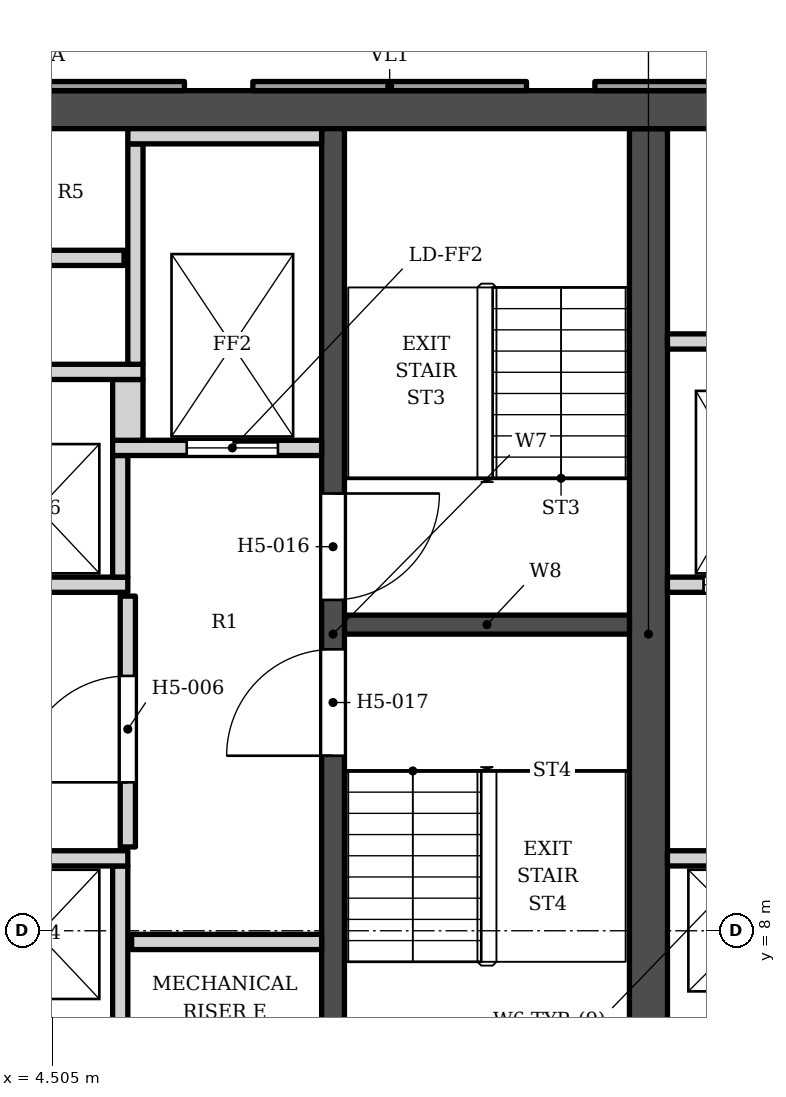
"""IFC4 building model, lengths in metres.
Left out: names, types, materials, properties, quantities, classifications, styles, units other than length and angle.
Written with IfcOpenShell. Run it as: python <this file> out.ifc"""

import sys

from ifc_helpers import new_model, si_unit, direction, frame, frame_2d, origin, place, context, subcontext, project, spatial, polyline, rectangle, outline, extrude, element, fill, save


model = new_model("IFC4")
c1 = context("Model", 3, precision=1e-05, world=origin(), true_north=direction((0.0, 1.0)))
c2 = subcontext(c1, "Body", "Model", "MODEL_VIEW")
j1 = project(units=[si_unit("LENGTHUNIT", "METRE"), si_unit("PLANEANGLEUNIT", "RADIAN")], contexts=[c1])
p1 = place(None, origin())
s1 = spatial("IfcSite", under=j1, at=p1, CompositionType="ELEMENT")
p2 = place(p1, origin())
s2 = spatial("IfcBuilding", under=s1, at=p2, CompositionType="ELEMENT")
p3 = place(p2, frame((0.0, 0.0, 91.8)))
s3 = spatial("IfcBuildingStorey", under=s2, at=p3, CompositionType="ELEMENT", Elevation=91.8)
p4 = place(p3, frame((-16.9, 18.802, 0.0), z_axis=(0.0, 0.0, 1.0), x_axis=(1.0, 0.0, 0.0)))
e1 = element("IfcWall", 1, at=p4, inside=s3, PredefinedType="SHEAR", context=c2, shape_type="SweptSolid", body=[
    extrude(rectangle(XDim=33.8, YDim=0.5, at=frame_2d((16.9, 0.0))), origin(), (0.0, 0.0, 1.0), 3.4),
])
p5 = place(p3, frame((12.35, 5.253, 0.0), z_axis=(0.0, 0.0, 1.0), x_axis=(0.0, 1.0, 0.0)))
e2 = element("IfcWall", 2, at=p5, inside=s3, PredefinedType="SHEAR", context=c2, shape_type="SweptSolid", body=[
    extrude(rectangle(XDim=13.3, YDim=0.5, at=frame_2d((6.65, 0.0))), origin(), (0.0, 0.0, 1.0), 3.4),
])
p6 = place(p3, frame((8.2, 5.253, 0.0), z_axis=(0.0, 0.0, 1.0), x_axis=(0.0, 1.0, 0.0)))
e3 = element("IfcWall", 3, at=p6, inside=s3, PredefinedType="SHEAR", context=c2, shape_type="SweptSolid", body=[
    extrude(rectangle(XDim=13.3, YDim=0.3, at=frame_2d((6.65, 0.0))), origin(), (0.0, 0.0, 1.0), 3.4),
])
p7 = place(p6, frame((7.1, 0.0, 0.0)))
e4 = element("IfcOpeningElement", 4, at=p7, cuts=e3, PredefinedType="OPENING", context=c2, shape_type="SweptSolid", body=[
    extrude(rectangle(XDim=1.4, YDim=2.1, at=frame_2d((0.7, 1.05))), frame((0.0, 0.16, 0.0), z_axis=(0.0, -1.0, 0.0), x_axis=(1.0, 0.0, 0.0)), (0.0, 0.0, 1.0), 0.32),
])
p8 = place(p6, frame((5.05, 0.0, 0.0)))
e5 = element("IfcOpeningElement", 5, at=p8, cuts=e3, PredefinedType="OPENING", context=c2, shape_type="SweptSolid", body=[
    extrude(rectangle(XDim=1.4, YDim=2.1, at=frame_2d((0.7, 1.05))), frame((0.0, 0.16, 0.0), z_axis=(0.0, -1.0, 0.0), x_axis=(1.0, 0.0, 0.0)), (0.0, 0.0, 1.0), 0.32),
])
p9 = place(p3, frame((8.35, 12.028, 0.0), z_axis=(0.0, 0.0, 1.0), x_axis=(1.0, 0.0, 0.0)))
e6 = element("IfcWall", 6, at=p9, inside=s3, PredefinedType="SHEAR", context=c2, shape_type="SweptSolid", body=[
    extrude(rectangle(XDim=3.75, YDim=0.25, at=frame_2d((1.875, 0.0))), origin(), (0.0, 0.0, 1.0), 3.4),
])
p10 = place(p3, origin())
e7 = element("IfcWall", 7, at=p10, inside=s3, PredefinedType="SOLIDWALL", context=c2, shape_type="SweptSolid", body=[
    extrude(outline(polyline([(11.645, 19.173), (11.645, 19.052), (15.245, 19.052), (15.245, 19.173), (11.645, 19.173)])), origin(), (0.0, 0.0, 1.0), 2.65),
])
p11 = place(p3, origin())
e8 = element("IfcWall", 8, at=p11, inside=s3, PredefinedType="ELEMENTEDWALL", context=c2, shape_type="SweptSolid", body=[
    extrude(outline(polyline([(7.145, 19.173), (7.145, 19.052), (10.745, 19.052), (10.745, 19.173), (7.145, 19.173)])), origin(), (0.0, 0.0, 1.0), 2.65),
])
p12 = place(p3, origin())
e9 = element("IfcWall", 9, at=p12, inside=s3, PredefinedType="SOLIDWALL", context=c2, shape_type="SweptSolid", body=[
    extrude(outline(polyline([(2.645, 19.173), (2.645, 19.052), (6.245, 19.052), (6.245, 19.173), (2.645, 19.173)])), origin(), (0.0, 0.0, 1.0), 2.65),
])
for number, where, z_axis, x_axis in (
    (10, (5.4, 6.353, 0.0), (0.0, 0.0, 1.0), (0.0, 1.0, 0.0)),
    (11, (5.55, 7.853, 0.0), (0.0, 0.0, 1.0), (1.0, 0.0, 0.0)),
):
    element("IfcWall", number, at=place(p3, frame(where, z_axis=z_axis, x_axis=x_axis)), inside=s3, PredefinedType="SOLIDWALL", context=c2, shape_type="SweptSolid", body=[
        extrude(rectangle(XDim=2.5, YDim=0.2, at=frame_2d((1.25, 0.0))), origin(), (0.0, 0.0, 1.0), 3.23),
    ])
p13 = place(p3, frame((1.0, 8.953, 0.0), z_axis=(0.0, 0.0, 1.0), x_axis=(1.0, 0.0, 0.0)))
e12 = element("IfcWall", 12, at=p13, inside=s3, PredefinedType="SOLIDWALL", context=c2, shape_type="SweptSolid", body=[
    extrude(rectangle(XDim=4.5, YDim=0.2, at=frame_2d((2.25, 0.0))), origin(), (0.0, 0.0, 1.0), 3.23),
])
p14 = place(p3, frame((12.6, 8.953, 0.0), z_axis=(0.0, 0.0, 1.0), x_axis=(1.0, 0.0, 0.0)))
e13 = element("IfcWall", 13, at=p14, inside=s3, PredefinedType="SOLIDWALL", context=c2, shape_type="SweptSolid", body=[
    extrude(rectangle(XDim=4.3, YDim=0.2, at=frame_2d((2.15, 0.0))), origin(), (0.0, 0.0, 1.0), 3.23),
])
p15 = place(p14, frame((0.525, 0.0, 0.0)))
e14 = element("IfcOpeningElement", 14, at=p15, cuts=e13, PredefinedType="OPENING", context=c2, shape_type="SweptSolid", body=[
    extrude(rectangle(XDim=1.1, YDim=2.1, at=frame_2d((0.55, 1.05))), frame((0.0, 0.11, 0.0), z_axis=(0.0, -1.0, 0.0), x_axis=(1.0, 0.0, 0.0)), (0.0, 0.0, 1.0), 0.22),
])
p16 = place(p14, frame((2.775, 0.0, 0.0)))
e15 = element("IfcOpeningElement", 15, at=p16, cuts=e13, PredefinedType="OPENING", context=c2, shape_type="SweptSolid", body=[
    extrude(rectangle(XDim=1.1, YDim=2.1, at=frame_2d((0.55, 1.05))), frame((0.0, 0.11, 0.0), z_axis=(0.0, -1.0, 0.0), x_axis=(1.0, 0.0, 0.0)), (0.0, 0.0, 1.0), 0.22),
])
p17 = place(p3, frame((5.5, 9.103, 0.0), z_axis=(0.0, 0.0, 1.0), x_axis=(0.0, 1.0, 0.0)))
e16 = element("IfcWall", 16, at=p17, inside=s3, PredefinedType="SOLIDWALL", context=c2, shape_type="SweptSolid", body=[
    extrude(rectangle(XDim=3.3, YDim=0.2, at=frame_2d((1.65, 0.0))), origin(), (0.0, 0.0, 1.0), 3.23),
])
p18 = place(p17, frame((0.85, 0.0, 0.0)))
e17 = element("IfcOpeningElement", 17, at=p18, cuts=e16, PredefinedType="OPENING", context=c2, shape_type="SweptSolid", body=[
    extrude(rectangle(XDim=1.4, YDim=2.1, at=frame_2d((0.7, 1.05))), frame((0.0, 0.11, 0.0), z_axis=(0.0, -1.0, 0.0), x_axis=(1.0, 0.0, 0.0)), (0.0, 0.0, 1.0), 0.22),
])
p19 = place(p3, frame((-1.5, 12.552, 0.0), z_axis=(0.0, 0.0, 1.0), x_axis=(1.0, 0.0, 0.0)))
e18 = element("IfcWall", 18, at=p19, inside=s3, PredefinedType="SOLIDWALL", context=c2, shape_type="SweptSolid", body=[
    extrude(rectangle(XDim=7.0, YDim=0.2, at=frame_2d((3.5, 0.0))), origin(), (0.0, 0.0, 1.0), 3.23),
])
p20 = place(p3, frame((12.6, 12.552, 0.0), z_axis=(0.0, 0.0, 1.0), x_axis=(1.0, 0.0, 0.0)))
e19 = element("IfcWall", 19, at=p20, inside=s3, PredefinedType="SOLIDWALL", context=c2, shape_type="SweptSolid", body=[
    extrude(rectangle(XDim=4.3, YDim=0.2, at=frame_2d((2.15, 0.0))), origin(), (0.0, 0.0, 1.0), 3.23),
])
p21 = place(p20, frame((0.475, 0.0, 0.0)))
e20 = element("IfcOpeningElement", 20, at=p21, cuts=e19, PredefinedType="OPENING", context=c2, shape_type="SweptSolid", body=[
    extrude(rectangle(XDim=1.2, YDim=2.1, at=frame_2d((0.6, 1.05))), frame((0.0, 0.11, 0.0), z_axis=(0.0, -1.0, 0.0), x_axis=(1.0, 0.0, 0.0)), (0.0, 0.0, 1.0), 0.22),
])
p22 = place(p20, frame((2.625, 0.0, 0.0)))
e21 = element("IfcOpeningElement", 21, at=p22, cuts=e19, PredefinedType="OPENING", context=c2, shape_type="SweptSolid", body=[
    extrude(rectangle(XDim=1.4, YDim=2.1, at=frame_2d((0.7, 1.05))), frame((0.0, 0.11, 0.0), z_axis=(0.0, -1.0, 0.0), x_axis=(1.0, 0.0, 0.0)), (0.0, 0.0, 1.0), 0.22),
])
p23 = place(p3, frame((5.4, 12.653, 0.0), z_axis=(0.0, 0.0, 1.0), x_axis=(0.0, 1.0, 0.0)))
e22 = element("IfcWall", 22, at=p23, inside=s3, PredefinedType="SOLIDWALL", context=c2, shape_type="SweptSolid", body=[
    extrude(rectangle(XDim=1.6, YDim=0.2, at=frame_2d((0.8, 0.0))), origin(), (0.0, 0.0, 1.0), 3.23),
])
p24 = place(p3, frame((5.3, 14.353, 0.0), z_axis=(0.0, 0.0, 1.0), x_axis=(1.0, 0.0, 0.0)))
e23 = element("IfcWall", 23, at=p24, inside=s3, PredefinedType="SOLIDWALL", context=c2, shape_type="SweptSolid", body=[
    extrude(rectangle(XDim=2.75, YDim=0.2, at=frame_2d((1.375, 0.0))), origin(), (0.0, 0.0, 1.0), 3.23),
])
p25 = place(p24, frame((0.975, 0.0, 0.0)))
e24 = element("IfcOpeningElement", 24, at=p25, cuts=e23, PredefinedType="OPENING", context=c2, shape_type="SweptSolid", body=[
    extrude(rectangle(XDim=1.2, YDim=2.1, at=frame_2d((0.6, 1.05))), frame((0.0, 0.11, 0.0), z_axis=(0.0, -1.0, 0.0), x_axis=(1.0, 0.0, 0.0)), (0.0, 0.0, 1.0), 0.22),
])
p26 = place(p3, frame((5.5, 14.453, 0.0), z_axis=(0.0, 0.0, 1.0), x_axis=(0.0, 1.0, 0.0)))
e25 = element("IfcWall", 25, at=p26, inside=s3, PredefinedType="SOLIDWALL", context=c2, shape_type="SweptSolid", body=[
    extrude(rectangle(XDim=0.8, YDim=0.4, at=frame_2d((0.4, 0.0))), origin(), (0.0, 0.0, 1.0), 3.23),
])
p27 = place(p3, frame((-1.5, 15.353, 0.0), z_axis=(0.0, 0.0, 1.0), x_axis=(1.0, 0.0, 0.0)))
e26 = element("IfcWall", 26, at=p27, inside=s3, PredefinedType="SOLIDWALL", context=c2, shape_type="SweptSolid", body=[
    extrude(rectangle(XDim=7.2, YDim=0.2, at=frame_2d((3.6, 0.0))), origin(), (0.0, 0.0, 1.0), 3.23),
])
p28 = place(p3, frame((5.6, 15.453, 0.0), z_axis=(0.0, 0.0, 1.0), x_axis=(0.0, 1.0, 0.0)))
e27 = element("IfcWall", 27, at=p28, inside=s3, PredefinedType="SOLIDWALL", context=c2, shape_type="SweptSolid", body=[
    extrude(rectangle(XDim=2.9, YDim=0.2, at=frame_2d((1.45, 0.0))), origin(), (0.0, 0.0, 1.0), 3.23),
])
p29 = place(p3, frame((12.6, 15.753, 0.0), z_axis=(0.0, 0.0, 1.0), x_axis=(1.0, 0.0, 0.0)))
e28 = element("IfcWall", 28, at=p29, inside=s3, PredefinedType="SOLIDWALL", context=c2, shape_type="SweptSolid", body=[
    extrude(rectangle(XDim=4.3, YDim=0.2, at=frame_2d((2.15, 0.0))), origin(), (0.0, 0.0, 1.0), 3.23),
])
p30 = place(p3, frame((-1.6, 16.853, 0.0), z_axis=(0.0, 0.0, 1.0), x_axis=(1.0, 0.0, 0.0)))
e29 = element("IfcWall", 29, at=p30, inside=s3, PredefinedType="SOLIDWALL", context=c2, shape_type="SweptSolid", body=[
    extrude(rectangle(XDim=7.05, YDim=0.2, at=frame_2d((3.525, 0.0))), origin(), (0.0, 0.0, 1.0), 3.23),
])
p31 = place(p30, frame((1.4, 0.0, 0.0)))
e30 = element("IfcOpeningElement", 30, at=p31, cuts=e29, PredefinedType="OPENING", context=c2, shape_type="SweptSolid", body=[
    extrude(rectangle(XDim=0.9, YDim=2.1, at=frame_2d((0.45, 1.05))), frame((0.0, 0.11, 0.0), z_axis=(0.0, -1.0, 0.0), x_axis=(1.0, 0.0, 0.0)), (0.0, 0.0, 1.0), 0.22),
])
p32 = place(p30, frame((4.9, 0.0, 0.0)))
e31 = element("IfcOpeningElement", 31, at=p32, cuts=e29, PredefinedType="OPENING", context=c2, shape_type="SweptSolid", body=[
    extrude(rectangle(XDim=0.9, YDim=2.1, at=frame_2d((0.45, 1.05))), frame((0.0, 0.11, 0.0), z_axis=(0.0, -1.0, 0.0), x_axis=(1.0, 0.0, 0.0)), (0.0, 0.0, 1.0), 0.22),
])
p33 = place(p3, frame((5.5, 18.453, 0.0), z_axis=(0.0, 0.0, 1.0), x_axis=(1.0, 0.0, 0.0)))
e32 = element("IfcWall", 32, at=p33, inside=s3, PredefinedType="SOLIDWALL", context=c2, shape_type="SweptSolid", body=[
    extrude(rectangle(XDim=2.55, YDim=0.2, at=frame_2d((1.275, 0.0))), origin(), (0.0, 0.0, 1.0), 3.23),
])
p34 = place(p25, origin())
e33 = element("IfcDoor", 33, at=p34, inside=s3, OperationType="DOUBLE_DOOR_SLIDING", PredefinedType="DOOR", context=c2, shape_type="SweptSolid", body=[
    extrude(rectangle(XDim=1.2, YDim=2.1, at=frame_2d((0.6, 1.05))), frame((0.0, 0.025, 0.0), z_axis=(0.0, -1.0, 0.0), x_axis=(1.0, 0.0, 0.0)), (0.0, 0.0, 1.0), 0.05),
])
fill(e24, e33)
p35 = place(p21, origin())
e34 = element("IfcDoor", 34, at=p35, inside=s3, OperationType="DOUBLE_DOOR_SLIDING", PredefinedType="DOOR", context=c2, shape_type="SweptSolid", body=[
    extrude(rectangle(XDim=1.2, YDim=2.1, at=frame_2d((0.6, 1.05))), frame((0.0, 0.025, 0.0), z_axis=(0.0, -1.0, 0.0), x_axis=(1.0, 0.0, 0.0)), (0.0, 0.0, 1.0), 0.05),
])
fill(e20, e34)
p36 = place(p7, origin())
e35 = element("IfcDoor", 35, at=p36, inside=s3, OperationType="SINGLE_SWING_RIGHT", PredefinedType="DOOR", context=c2, shape_type="SweptSolid", body=[
    extrude(rectangle(XDim=1.4, YDim=2.1, at=frame_2d((0.7, 1.05))), frame((0.0, 0.025, 0.0), z_axis=(0.0, -1.0, 0.0), x_axis=(1.0, 0.0, 0.0)), (0.0, 0.0, 1.0), 0.05),
])
fill(e4, e35)
p37 = place(p8, origin())
e36 = element("IfcDoor", 36, at=p37, inside=s3, OperationType="SINGLE_SWING_LEFT", PredefinedType="DOOR", context=c2, shape_type="SweptSolid", body=[
    extrude(rectangle(XDim=1.4, YDim=2.1, at=frame_2d((0.7, 1.05))), frame((0.0, 0.025, 0.0), z_axis=(0.0, -1.0, 0.0), x_axis=(1.0, 0.0, 0.0)), (0.0, 0.0, 1.0), 0.05),
])
fill(e5, e36)
p38 = place(p18, origin())
e37 = element("IfcDoor", 37, at=p38, inside=s3, OperationType="SINGLE_SWING_LEFT", PredefinedType="DOOR", context=c2, shape_type="SweptSolid", body=[
    extrude(rectangle(XDim=1.4, YDim=2.1, at=frame_2d((0.7, 1.05))), frame((0.0, 0.025, 0.0), z_axis=(0.0, -1.0, 0.0), x_axis=(1.0, 0.0, 0.0)), (0.0, 0.0, 1.0), 0.05),
])
fill(e17, e37)
save(model, sys.argv[1])
